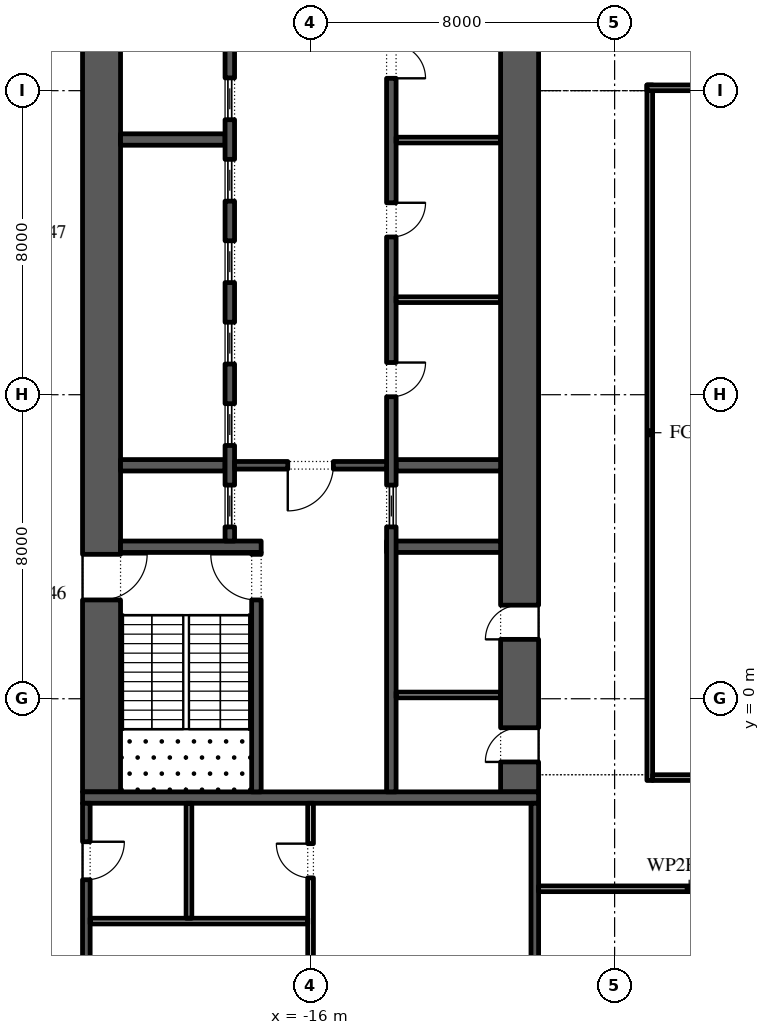
"""IFC4 building model, lengths in metres.
Left out: names, types, materials, properties, quantities, classifications, styles, units other than length and angle.
Written with IfcOpenShell. Run it as: python <this file> out.ifc"""

import sys

from ifc_helpers import new_model, si_unit, direction, frame, frame_2d, origin, place, context, subcontext, project, spatial, rectangle, extrude, element, fill, save


model = new_model("IFC4")
c1 = context("Model", 3, precision=1e-05, world=origin(), true_north=direction((0.0, 1.0)))
c2 = subcontext(c1, "Body", "Model", "MODEL_VIEW")
j1 = project(units=[si_unit("LENGTHUNIT", "METRE"), si_unit("PLANEANGLEUNIT", "RADIAN")], contexts=[c1])
p1 = place(None, origin())
s1 = spatial("IfcSite", under=j1, at=p1, CompositionType="ELEMENT")
p2 = place(p1, origin())
s2 = spatial("IfcBuilding", under=s1, at=p2, CompositionType="ELEMENT")
p3 = place(p2, frame((0.0, 0.0, 19.2)))
s3 = spatial("IfcBuildingStorey", under=s2, at=p3, CompositionType="ELEMENT", Elevation=19.2)
p4 = place(p3, frame((-7.075, -2.15, 0.0), z_axis=(0.0, 0.0, 1.0), x_axis=(0.0, 1.0, 0.0)))
e1 = element("IfcWall", 1, at=p4, inside=s3, PredefinedType="STANDARD", context=c2, shape_type="SweptSolid", body=[
    extrude(rectangle(XDim=18.3, YDim=0.15, at=frame_2d((9.15, 0.0))), origin(), (0.0, 0.0, 1.0), 4.5),
])
for number, where, z_axis, x_axis in (
    (2, (-7.15, 16.075, 0.0), (0.0, 0.0, 1.0), (1.0, 0.0, 0.0)),
    (3, (7.15, -2.075, 0.0), (0.0, 0.0, 1.0), (-1.0, 0.0, 0.0)),
):
    element("IfcWall", number, at=place(p3, frame(where, z_axis=z_axis, x_axis=x_axis)), inside=s3, PredefinedType="STANDARD", context=c2, shape_type="SweptSolid", body=[
        extrude(rectangle(XDim=14.15, YDim=0.15, at=frame_2d((7.075, 0.0))), origin(), (0.0, 0.0, 1.0), 3.52),
    ])
p5 = place(p3, frame((-21.5, -2.45, 0.0), z_axis=(0.0, 0.0, 1.0), x_axis=(0.0, 1.0, 0.0)))
e4 = element("IfcWall", 4, at=p5, inside=s3, PredefinedType="SHEAR", context=c2, shape_type="SweptSolid", body=[
    extrude(rectangle(XDim=27.9, YDim=1.0, at=frame_2d((13.95, 0.0))), origin(), (0.0, 0.0, 1.0), 4.5),
])
p6 = place(p5, frame((5.05, 0.0, 0.0)))
e5 = element("IfcOpeningElement", 5, at=p6, cuts=e4, PredefinedType="OPENING", context=c2, shape_type="SweptSolid", body=[
    extrude(rectangle(XDim=1.2, YDim=2.1, at=frame_2d((0.6, 1.05))), frame((0.0, 0.51, 0.0), z_axis=(0.0, -1.0, 0.0), x_axis=(1.0, 0.0, 0.0)), (0.0, 0.0, 1.0), 1.02),
])
p7 = place(p5, frame((21.65, 0.0, 0.0)))
e6 = element("IfcOpeningElement", 6, at=p7, cuts=e4, PredefinedType="OPENING", context=c2, shape_type="SweptSolid", body=[
    extrude(rectangle(XDim=1.2, YDim=2.1, at=frame_2d((0.6, 1.05))), frame((0.0, 0.51, 0.0), z_axis=(0.0, -1.0, 0.0), x_axis=(1.0, 0.0, 0.0)), (0.0, 0.0, 1.0), 1.02),
])
p8 = place(p3, frame((-10.5, -2.45, 0.0), z_axis=(0.0, 0.0, 1.0), x_axis=(0.0, 1.0, 0.0)))
e7 = element("IfcWall", 7, at=p8, inside=s3, PredefinedType="SHEAR", context=c2, shape_type="SweptSolid", body=[
    extrude(rectangle(XDim=27.9, YDim=1.0, at=frame_2d((13.95, 0.0))), origin(), (0.0, 0.0, 1.0), 4.5),
])
p9 = place(p8, frame((23.65, 0.0, 0.0)))
e8 = element("IfcOpeningElement", 8, at=p9, cuts=e7, PredefinedType="OPENING", context=c2, shape_type="SweptSolid", body=[
    extrude(rectangle(XDim=2.4, YDim=2.1, at=frame_2d((1.2, 1.05))), frame((0.0, 0.51, 0.0), z_axis=(0.0, -1.0, 0.0), x_axis=(1.0, 0.0, 0.0)), (0.0, 0.0, 1.0), 1.02),
])
p10 = place(p8, frame((0.788, 0.0, 0.0)))
e9 = element("IfcOpeningElement", 9, at=p10, cuts=e7, PredefinedType="OPENING", context=c2, shape_type="SweptSolid", body=[
    extrude(rectangle(XDim=0.9, YDim=2.1, at=frame_2d((0.45, 1.05))), frame((0.0, 0.51, 0.0), z_axis=(0.0, -1.0, 0.0), x_axis=(1.0, 0.0, 0.0)), (0.0, 0.0, 1.0), 1.02),
])
p11 = place(p8, frame((4.012, 0.0, 0.0)))
e10 = element("IfcOpeningElement", 10, at=p11, cuts=e7, PredefinedType="OPENING", context=c2, shape_type="SweptSolid", body=[
    extrude(rectangle(XDim=0.9, YDim=2.1, at=frame_2d((0.45, 1.05))), frame((0.0, 0.51, 0.0), z_axis=(0.0, -1.0, 0.0), x_axis=(1.0, 0.0, 0.0)), (0.0, 0.0, 1.0), 1.02),
])
p12 = place(p3, frame((-22.0, -2.6, 0.0), z_axis=(0.0, 0.0, 1.0), x_axis=(1.0, 0.0, 0.0)))
e11 = element("IfcWall", 11, at=p12, inside=s3, PredefinedType="SHEAR", context=c2, shape_type="SweptSolid", body=[
    extrude(rectangle(XDim=12.0, YDim=0.3, at=frame_2d((6.0, 0.0))), origin(), (0.0, 0.0, 1.0), 4.5),
])
p13 = place(p3, frame((-21.0, 4.0, 0.0), z_axis=(0.0, 0.0, 1.0), x_axis=(1.0, 0.0, 0.0)))
e12 = element("IfcWall", 12, at=p13, inside=s3, PredefinedType="SHEAR", context=c2, shape_type="SweptSolid", body=[
    extrude(rectangle(XDim=3.7, YDim=0.3, at=frame_2d((1.85, 0.0))), origin(), (0.0, 0.0, 1.0), 4.5),
])
p14 = place(p3, frame((-17.425, -2.45, 0.0), z_axis=(0.0, 0.0, 1.0), x_axis=(0.0, 1.0, 0.0)))
e13 = element("IfcWall", 13, at=p14, inside=s3, PredefinedType="SHEAR", context=c2, shape_type="SweptSolid", body=[
    extrude(rectangle(XDim=6.3, YDim=0.25, at=frame_2d((3.15, 0.0))), origin(), (0.0, 0.0, 1.0), 4.5),
])
p15 = place(p14, frame((5.05, 0.0, 0.0)))
e14 = element("IfcOpeningElement", 14, at=p15, cuts=e13, PredefinedType="OPENING", context=c2, shape_type="SweptSolid", body=[
    extrude(rectangle(XDim=1.2, YDim=2.1, at=frame_2d((0.6, 1.05))), frame((0.0, 0.135, 0.0), z_axis=(0.0, -1.0, 0.0), x_axis=(1.0, 0.0, 0.0)), (0.0, 0.0, 1.0), 0.27),
])
for number, where, z_axis, x_axis in (
    (15, (-21.0, 6.143, 0.0), (0.0, 0.0, 1.0), (1.0, 0.0, 0.0)),
    (16, (-21.0, 14.714, 0.0), (0.0, 0.0, 1.0), (1.0, 0.0, 0.0)),
):
    element("IfcWall", number, at=place(p3, frame(where, z_axis=z_axis, x_axis=x_axis)), inside=s3, PredefinedType="SHEAR", context=c2, shape_type="SweptSolid", body=[
        extrude(rectangle(XDim=2.75, YDim=0.3, at=frame_2d((1.375, 0.0))), origin(), (0.0, 0.0, 1.0), 4.5),
    ])
p16 = place(p3, frame((-18.125, 4.15, 0.0), z_axis=(0.0, 0.0, 1.0), x_axis=(0.0, 1.0, 0.0)))
e17 = element("IfcWall", 17, at=p16, inside=s3, PredefinedType="SHEAR", context=c2, shape_type="SweptSolid", body=[
    extrude(rectangle(XDim=14.7, YDim=0.25, at=frame_2d((7.35, 0.0))), origin(), (0.0, 0.0, 1.0), 4.5),
])
p17 = place(p16, frame((0.371, 0.0, 0.0)))
e18 = element("IfcOpeningElement", 18, at=p17, cuts=e17, PredefinedType="OPENING", context=c2, shape_type="SweptSolid", body=[
    extrude(rectangle(XDim=1.1, YDim=2.1, at=frame_2d((0.55, 1.05))), frame((0.0, 0.135, 0.0), z_axis=(0.0, -1.0, 0.0), x_axis=(1.0, 0.0, 0.0)), (0.0, 0.0, 1.0), 0.27),
])
p18 = place(p16, frame((2.514, 0.0, 0.0)))
e19 = element("IfcOpeningElement", 19, at=p18, cuts=e17, PredefinedType="OPENING", context=c2, shape_type="SweptSolid", body=[
    extrude(rectangle(XDim=1.1, YDim=2.1, at=frame_2d((0.55, 1.05))), frame((0.0, 0.135, 0.0), z_axis=(0.0, -1.0, 0.0), x_axis=(1.0, 0.0, 0.0)), (0.0, 0.0, 1.0), 0.27),
])
p19 = place(p16, frame((4.657, 0.0, 0.0)))
e20 = element("IfcOpeningElement", 20, at=p19, cuts=e17, PredefinedType="OPENING", context=c2, shape_type="SweptSolid", body=[
    extrude(rectangle(XDim=1.1, YDim=2.1, at=frame_2d((0.55, 1.05))), frame((0.0, 0.135, 0.0), z_axis=(0.0, -1.0, 0.0), x_axis=(1.0, 0.0, 0.0)), (0.0, 0.0, 1.0), 0.27),
])
p20 = place(p16, frame((6.8, 0.0, 0.0)))
e21 = element("IfcOpeningElement", 21, at=p20, cuts=e17, PredefinedType="OPENING", context=c2, shape_type="SweptSolid", body=[
    extrude(rectangle(XDim=1.1, YDim=2.1, at=frame_2d((0.55, 1.05))), frame((0.0, 0.135, 0.0), z_axis=(0.0, -1.0, 0.0), x_axis=(1.0, 0.0, 0.0)), (0.0, 0.0, 1.0), 0.27),
])
p21 = place(p16, frame((8.943, 0.0, 0.0)))
e22 = element("IfcOpeningElement", 22, at=p21, cuts=e17, PredefinedType="OPENING", context=c2, shape_type="SweptSolid", body=[
    extrude(rectangle(XDim=1.1, YDim=2.1, at=frame_2d((0.55, 1.05))), frame((0.0, 0.135, 0.0), z_axis=(0.0, -1.0, 0.0), x_axis=(1.0, 0.0, 0.0)), (0.0, 0.0, 1.0), 0.27),
])
p22 = place(p16, frame((11.086, 0.0, 0.0)))
e23 = element("IfcOpeningElement", 23, at=p22, cuts=e17, PredefinedType="OPENING", context=c2, shape_type="SweptSolid", body=[
    extrude(rectangle(XDim=1.1, YDim=2.1, at=frame_2d((0.55, 1.05))), frame((0.0, 0.135, 0.0), z_axis=(0.0, -1.0, 0.0), x_axis=(1.0, 0.0, 0.0)), (0.0, 0.0, 1.0), 0.27),
])
p23 = place(p16, frame((13.229, 0.0, 0.0)))
e24 = element("IfcOpeningElement", 24, at=p23, cuts=e17, PredefinedType="OPENING", context=c2, shape_type="SweptSolid", body=[
    extrude(rectangle(XDim=1.1, YDim=2.1, at=frame_2d((0.55, 1.05))), frame((0.0, 0.135, 0.0), z_axis=(0.0, -1.0, 0.0), x_axis=(1.0, 0.0, 0.0)), (0.0, 0.0, 1.0), 0.27),
])
p24 = place(p3, frame((-14.0, 4.0, 0.0), z_axis=(0.0, 0.0, 1.0), x_axis=(1.0, 0.0, 0.0)))
e25 = element("IfcWall", 25, at=p24, inside=s3, PredefinedType="SHEAR", context=c2, shape_type="SweptSolid", body=[
    extrude(rectangle(XDim=3.0, YDim=0.3, at=frame_2d((1.5, 0.0))), origin(), (0.0, 0.0, 1.0), 4.5),
])
p25 = place(p3, frame((-13.75, 6.143, 0.0), z_axis=(0.0, 0.0, 1.0), x_axis=(1.0, 0.0, 0.0)))
e26 = element("IfcWall", 26, at=p25, inside=s3, PredefinedType="SHEAR", context=c2, shape_type="SweptSolid", body=[
    extrude(rectangle(XDim=2.75, YDim=0.3, at=frame_2d((1.375, 0.0))), origin(), (0.0, 0.0, 1.0), 4.5),
])
p26 = place(p3, frame((-13.875, -2.45, 0.0), z_axis=(0.0, 0.0, 1.0), x_axis=(0.0, 1.0, 0.0)))
e27 = element("IfcWall", 27, at=p26, inside=s3, PredefinedType="SHEAR", context=c2, shape_type="SweptSolid", body=[
    extrude(rectangle(XDim=21.3, YDim=0.25, at=frame_2d((10.65, 0.0))), origin(), (0.0, 0.0, 1.0), 4.5),
])
p27 = place(p26, frame((10.396, 0.0, 0.0)))
e28 = element("IfcOpeningElement", 28, at=p27, cuts=e27, PredefinedType="OPENING", context=c2, shape_type="SweptSolid", body=[
    extrude(rectangle(XDim=0.9, YDim=2.1, at=frame_2d((0.45, 1.05))), frame((0.0, 0.135, 0.0), z_axis=(0.0, -1.0, 0.0), x_axis=(1.0, 0.0, 0.0)), (0.0, 0.0, 1.0), 0.27),
])
p28 = place(p26, frame((14.6, 0.0, 0.0)))
e29 = element("IfcOpeningElement", 29, at=p28, cuts=e27, PredefinedType="OPENING", context=c2, shape_type="SweptSolid", body=[
    extrude(rectangle(XDim=0.9, YDim=2.1, at=frame_2d((0.45, 1.05))), frame((0.0, 0.135, 0.0), z_axis=(0.0, -1.0, 0.0), x_axis=(1.0, 0.0, 0.0)), (0.0, 0.0, 1.0), 0.27),
])
p29 = place(p26, frame((18.775, 0.0, 0.0)))
e30 = element("IfcOpeningElement", 30, at=p29, cuts=e27, PredefinedType="OPENING", context=c2, shape_type="SweptSolid", body=[
    extrude(rectangle(XDim=0.9, YDim=2.1, at=frame_2d((0.45, 1.05))), frame((0.0, 0.135, 0.0), z_axis=(0.0, -1.0, 0.0), x_axis=(1.0, 0.0, 0.0)), (0.0, 0.0, 1.0), 0.27),
])
p30 = place(p26, frame((6.971, 0.0, 0.0)))
e31 = element("IfcOpeningElement", 31, at=p30, cuts=e27, PredefinedType="OPENING", context=c2, shape_type="SweptSolid", body=[
    extrude(rectangle(XDim=1.1, YDim=2.1, at=frame_2d((0.55, 1.05))), frame((0.0, 0.135, 0.0), z_axis=(0.0, -1.0, 0.0), x_axis=(1.0, 0.0, 0.0)), (0.0, 0.0, 1.0), 0.27),
])
for number, where, z_axis, x_axis in (
    (32, (-13.75, 10.5, 0.0), (0.0, 0.0, 1.0), (1.0, 0.0, 0.0)),
    (33, (-13.75, 14.7, 0.0), (0.0, 0.0, 1.0), (1.0, 0.0, 0.0)),
):
    element("IfcWall", number, at=place(p3, frame(where, z_axis=z_axis, x_axis=x_axis)), inside=s3, PredefinedType="PARTITIONING", context=c2, shape_type="SweptSolid", body=[
        extrude(rectangle(XDim=2.75, YDim=0.15, at=frame_2d((1.375, 0.0))), origin(), (0.0, 0.0, 1.0), 4.5),
    ])
p31 = place(p3, frame((-18.0, 6.143, 0.0), z_axis=(0.0, 0.0, 1.0), x_axis=(1.0, 0.0, 0.0)))
e34 = element("IfcWall", 34, at=p31, inside=s3, PredefinedType="SHEAR", context=c2, shape_type="SweptSolid", body=[
    extrude(rectangle(XDim=4.0, YDim=0.2, at=frame_2d((2.0, 0.0))), origin(), (0.0, 0.0, 1.0), 4.5),
])
p32 = place(p31, frame((1.4, 0.0, 0.0)))
e35 = element("IfcOpeningElement", 35, at=p32, cuts=e34, PredefinedType="OPENING", context=c2, shape_type="SweptSolid", body=[
    extrude(rectangle(XDim=1.2, YDim=2.1, at=frame_2d((0.6, 1.05))), frame((0.0, 0.11, 0.0), z_axis=(0.0, -1.0, 0.0), x_axis=(1.0, 0.0, 0.0)), (0.0, 0.0, 1.0), 0.22),
])
p33 = place(p3, frame((-13.75, 0.1, 0.0), z_axis=(0.0, 0.0, 1.0), x_axis=(1.0, 0.0, 0.0)))
e36 = element("IfcWall", 36, at=p33, inside=s3, PredefinedType="PARTITIONING", context=c2, shape_type="SweptSolid", body=[
    extrude(rectangle(XDim=2.75, YDim=0.15, at=frame_2d((1.375, 0.0))), origin(), (0.0, 0.0, 1.0), 4.5),
])
p34 = place(p3, frame((-21.9, -15.8, 0.0), z_axis=(0.0, 0.0, 1.0), x_axis=(0.0, 1.0, 0.0)))
e37 = element("IfcWall", 37, at=p34, inside=s3, PredefinedType="SHEAR", context=c2, shape_type="SweptSolid", body=[
    extrude(rectangle(XDim=13.05, YDim=0.2, at=frame_2d((6.525, 0.0))), origin(), (0.0, 0.0, 1.0), 4.5),
])
p35 = place(p34, frame((4.488, 0.0, 0.0)))
e38 = element("IfcOpeningElement", 38, at=p35, cuts=e37, PredefinedType="OPENING", context=c2, shape_type="SweptSolid", body=[
    extrude(rectangle(XDim=0.9, YDim=2.1, at=frame_2d((0.45, 1.05))), frame((0.0, 0.11, 0.0), z_axis=(0.0, -1.0, 0.0), x_axis=(1.0, 0.0, 0.0)), (0.0, 0.0, 1.0), 0.22),
])
p36 = place(p34, frame((11.038, 0.0, 0.0)))
e39 = element("IfcOpeningElement", 39, at=p36, cuts=e37, PredefinedType="OPENING", context=c2, shape_type="SweptSolid", body=[
    extrude(rectangle(XDim=1.0, YDim=2.1, at=frame_2d((0.5, 1.05))), frame((0.0, 0.11, 0.0), z_axis=(0.0, -1.0, 0.0), x_axis=(1.0, 0.0, 0.0)), (0.0, 0.0, 1.0), 0.22),
])
p37 = place(p3, frame((-10.1, -15.8, 0.0), z_axis=(0.0, 0.0, 1.0), x_axis=(0.0, 1.0, 0.0)))
e40 = element("IfcWall", 40, at=p37, inside=s3, PredefinedType="SHEAR", context=c2, shape_type="SweptSolid", body=[
    extrude(rectangle(XDim=13.05, YDim=0.2, at=frame_2d((6.525, 0.0))), origin(), (0.0, 0.0, 1.0), 4.5),
])
p38 = place(p37, frame((6.075, 0.0, 0.0)))
e41 = element("IfcOpeningElement", 41, at=p38, cuts=e40, PredefinedType="OPENING", context=c2, shape_type="SweptSolid", body=[
    extrude(rectangle(XDim=0.9, YDim=2.1, at=frame_2d((0.45, 1.05))), frame((0.0, 0.11, 0.0), z_axis=(0.0, -1.0, 0.0), x_axis=(1.0, 0.0, 0.0)), (0.0, 0.0, 1.0), 0.22),
])
p39 = place(p3, frame((-16.0, -15.8, 0.0), z_axis=(0.0, 0.0, 1.0), x_axis=(0.0, 1.0, 0.0)))
e42 = element("IfcWall", 42, at=p39, inside=s3, PredefinedType="PARTITIONING", context=c2, shape_type="SweptSolid", body=[
    extrude(rectangle(XDim=13.05, YDim=0.15, at=frame_2d((6.525, 0.0))), origin(), (0.0, 0.0, 1.0), 4.5),
])
p40 = place(p39, frame((11.087, 0.0, 0.0)))
e43 = element("IfcOpeningElement", 43, at=p40, cuts=e42, PredefinedType="OPENING", context=c2, shape_type="SweptSolid", body=[
    extrude(rectangle(XDim=0.9, YDim=2.1, at=frame_2d((0.45, 1.05))), frame((0.0, 0.085, 0.0), z_axis=(0.0, -1.0, 0.0), x_axis=(1.0, 0.0, 0.0)), (0.0, 0.0, 1.0), 0.17),
])
p41 = place(p3, frame((-21.8, -5.85, 0.0), z_axis=(0.0, 0.0, 1.0), x_axis=(1.0, 0.0, 0.0)))
e44 = element("IfcWall", 44, at=p41, inside=s3, PredefinedType="PARTITIONING", context=c2, shape_type="SweptSolid", body=[
    extrude(rectangle(XDim=5.725, YDim=0.15, at=frame_2d((2.863, 0.0))), origin(), (0.0, 0.0, 1.0), 4.5),
])
p42 = place(p3, frame((-19.2, -5.775, 0.0), z_axis=(0.0, 0.0, 1.0), x_axis=(0.0, 1.0, 0.0)))
e45 = element("IfcWall", 45, at=p42, inside=s3, PredefinedType="PARTITIONING", context=c2, shape_type="SweptSolid", body=[
    extrude(rectangle(XDim=3.025, YDim=0.15, at=frame_2d((1.512, 0.0))), origin(), (0.0, 0.0, 1.0), 4.5),
])
p43 = place(p3, frame((-10.0, -5.0, 0.0), z_axis=(0.0, 0.0, 1.0), x_axis=(1.0, 0.0, 0.0)))
e46 = element("IfcWall", 46, at=p43, inside=s3, PredefinedType="PARTITIONING", context=c2, shape_type="SweptSolid", body=[
    extrude(rectangle(XDim=7.925, YDim=0.15, at=frame_2d((3.962, 0.0))), origin(), (0.0, 0.0, 1.0), 4.5),
])
p44 = place(p17, origin())
e47 = element("IfcDoor", 47, at=p44, inside=s3, OperationType="SLIDING_TO_LEFT", PredefinedType="DOOR", context=c2, shape_type="SweptSolid", body=[
    extrude(rectangle(XDim=1.1, YDim=2.1, at=frame_2d((0.55, 1.05))), frame((0.0, 0.025, 0.0), z_axis=(0.0, -1.0, 0.0), x_axis=(1.0, 0.0, 0.0)), (0.0, 0.0, 1.0), 0.05),
])
fill(e18, e47)
p45 = place(p18, origin())
e48 = element("IfcDoor", 48, at=p45, inside=s3, OperationType="SLIDING_TO_LEFT", PredefinedType="DOOR", context=c2, shape_type="SweptSolid", body=[
    extrude(rectangle(XDim=1.1, YDim=2.1, at=frame_2d((0.55, 1.05))), frame((0.0, 0.025, 0.0), z_axis=(0.0, -1.0, 0.0), x_axis=(1.0, 0.0, 0.0)), (0.0, 0.0, 1.0), 0.05),
])
fill(e19, e48)
p46 = place(p19, origin())
e49 = element("IfcDoor", 49, at=p46, inside=s3, OperationType="SLIDING_TO_LEFT", PredefinedType="DOOR", context=c2, shape_type="SweptSolid", body=[
    extrude(rectangle(XDim=1.1, YDim=2.1, at=frame_2d((0.55, 1.05))), frame((0.0, 0.025, 0.0), z_axis=(0.0, -1.0, 0.0), x_axis=(1.0, 0.0, 0.0)), (0.0, 0.0, 1.0), 0.05),
])
fill(e20, e49)
p47 = place(p20, origin())
e50 = element("IfcDoor", 50, at=p47, inside=s3, OperationType="SLIDING_TO_LEFT", PredefinedType="DOOR", context=c2, shape_type="SweptSolid", body=[
    extrude(rectangle(XDim=1.1, YDim=2.1, at=frame_2d((0.55, 1.05))), frame((0.0, 0.025, 0.0), z_axis=(0.0, -1.0, 0.0), x_axis=(1.0, 0.0, 0.0)), (0.0, 0.0, 1.0), 0.05),
])
fill(e21, e50)
p48 = place(p21, origin())
e51 = element("IfcDoor", 51, at=p48, inside=s3, OperationType="SLIDING_TO_LEFT", PredefinedType="DOOR", context=c2, shape_type="SweptSolid", body=[
    extrude(rectangle(XDim=1.1, YDim=2.1, at=frame_2d((0.55, 1.05))), frame((0.0, 0.025, 0.0), z_axis=(0.0, -1.0, 0.0), x_axis=(1.0, 0.0, 0.0)), (0.0, 0.0, 1.0), 0.05),
])
fill(e22, e51)
p49 = place(p22, origin())
e52 = element("IfcDoor", 52, at=p49, inside=s3, OperationType="SLIDING_TO_LEFT", PredefinedType="DOOR", context=c2, shape_type="SweptSolid", body=[
    extrude(rectangle(XDim=1.1, YDim=2.1, at=frame_2d((0.55, 1.05))), frame((0.0, 0.025, 0.0), z_axis=(0.0, -1.0, 0.0), x_axis=(1.0, 0.0, 0.0)), (0.0, 0.0, 1.0), 0.05),
])
fill(e23, e52)
p50 = place(p27, frame((0.9, -0.2, 0.0), z_axis=(0.0, 0.0, 1.0), x_axis=(-1.0, 0.0, 0.0)))
e53 = element("IfcDoor", 53, at=p50, inside=s3, OperationType="SINGLE_SWING_RIGHT", PredefinedType="DOOR", context=c2, shape_type="SweptSolid", body=[
    extrude(rectangle(XDim=0.9, YDim=2.1, at=frame_2d((0.45, 1.05))), frame((0.0, -0.075, 0.0), z_axis=(0.0, -1.0, 0.0), x_axis=(1.0, 0.0, 0.0)), (0.0, 0.0, 1.0), 0.05),
])
fill(e28, e53)
p51 = place(p28, frame((0.9, -0.2, 0.0), z_axis=(0.0, 0.0, 1.0), x_axis=(-1.0, 0.0, 0.0)))
e54 = element("IfcDoor", 54, at=p51, inside=s3, OperationType="SINGLE_SWING_RIGHT", PredefinedType="DOOR", context=c2, shape_type="SweptSolid", body=[
    extrude(rectangle(XDim=0.9, YDim=2.1, at=frame_2d((0.45, 1.05))), frame((0.0, -0.075, 0.0), z_axis=(0.0, -1.0, 0.0), x_axis=(1.0, 0.0, 0.0)), (0.0, 0.0, 1.0), 0.05),
])
fill(e29, e54)
p52 = place(p29, frame((0.9, -0.2, 0.0), z_axis=(0.0, 0.0, 1.0), x_axis=(-1.0, 0.0, 0.0)))
e55 = element("IfcDoor", 55, at=p52, inside=s3, OperationType="SINGLE_SWING_LEFT", PredefinedType="DOOR", context=c2, shape_type="SweptSolid", body=[
    extrude(rectangle(XDim=0.9, YDim=2.1, at=frame_2d((0.45, 1.05))), frame((0.0, -0.075, 0.0), z_axis=(0.0, -1.0, 0.0), x_axis=(1.0, 0.0, 0.0)), (0.0, 0.0, 1.0), 0.05),
])
fill(e30, e55)
p53 = place(p30, origin())
e56 = element("IfcDoor", 56, at=p53, inside=s3, OperationType="SLIDING_TO_LEFT", PredefinedType="DOOR", context=c2, shape_type="SweptSolid", body=[
    extrude(rectangle(XDim=1.1, YDim=2.1, at=frame_2d((0.55, 1.05))), frame((0.0, 0.025, 0.0), z_axis=(0.0, -1.0, 0.0), x_axis=(1.0, 0.0, 0.0)), (0.0, 0.0, 1.0), 0.05),
])
fill(e31, e56)
p54 = place(p32, frame((1.2, 0.0, 0.0), z_axis=(0.0, 0.0, 1.0), x_axis=(-1.0, 0.0, 0.0)))
e57 = element("IfcDoor", 57, at=p54, inside=s3, OperationType="SINGLE_SWING_LEFT", PredefinedType="DOOR", context=c2, shape_type="SweptSolid", body=[
    extrude(rectangle(XDim=1.2, YDim=2.1, at=frame_2d((0.6, 1.05))), frame((0.0, 0.025, 0.0), z_axis=(0.0, -1.0, 0.0), x_axis=(1.0, 0.0, 0.0)), (0.0, 0.0, 1.0), 0.05),
])
fill(e35, e57)
p55 = place(p15, origin())
e58 = element("IfcDoor", 58, at=p55, inside=s3, OperationType="SINGLE_SWING_LEFT", PredefinedType="DOOR", context=c2, shape_type="SweptSolid", body=[
    extrude(rectangle(XDim=1.2, YDim=2.1, at=frame_2d((0.6, 1.05))), frame((0.0, 0.025, 0.0), z_axis=(0.0, -1.0, 0.0), x_axis=(1.0, 0.0, 0.0)), (0.0, 0.0, 1.0), 0.05),
])
fill(e14, e58)
p56 = place(p6, frame((1.2, 0.0, 0.0), z_axis=(0.0, 0.0, 1.0), x_axis=(-1.0, 0.0, 0.0)))
e59 = element("IfcDoor", 59, at=p56, inside=s3, OperationType="SINGLE_SWING_RIGHT", PredefinedType="DOOR", context=c2, shape_type="SweptSolid", body=[
    extrude(rectangle(XDim=1.2, YDim=2.1, at=frame_2d((0.6, 1.05))), frame((0.0, 0.025, 0.0), z_axis=(0.0, -1.0, 0.0), x_axis=(1.0, 0.0, 0.0)), (0.0, 0.0, 1.0), 0.05),
])
fill(e5, e59)
p57 = place(p10, origin())
e60 = element("IfcDoor", 60, at=p57, inside=s3, OperationType="SINGLE_SWING_RIGHT", PredefinedType="DOOR", context=c2, shape_type="SweptSolid", body=[
    extrude(rectangle(XDim=0.9, YDim=2.1, at=frame_2d((0.45, 1.05))), frame((0.0, 0.5, 0.0), z_axis=(0.0, -1.0, 0.0), x_axis=(1.0, 0.0, 0.0)), (0.0, 0.0, 1.0), 0.05),
])
fill(e9, e60)
p58 = place(p11, origin())
e61 = element("IfcDoor", 61, at=p58, inside=s3, OperationType="SINGLE_SWING_RIGHT", PredefinedType="DOOR", context=c2, shape_type="SweptSolid", body=[
    extrude(rectangle(XDim=0.9, YDim=2.1, at=frame_2d((0.45, 1.05))), frame((0.0, 0.5, 0.0), z_axis=(0.0, -1.0, 0.0), x_axis=(1.0, 0.0, 0.0)), (0.0, 0.0, 1.0), 0.05),
])
fill(e10, e61)
p59 = place(p36, frame((1.0, -0.15, 0.0), z_axis=(0.0, 0.0, 1.0), x_axis=(-1.0, 0.0, 0.0)))
e62 = element("IfcDoor", 62, at=p59, inside=s3, OperationType="SINGLE_SWING_RIGHT", PredefinedType="DOOR", context=c2, shape_type="SweptSolid", body=[
    extrude(rectangle(XDim=1.0, YDim=2.1, at=frame_2d((0.5, 1.05))), frame((0.0, -0.05, 0.0), z_axis=(0.0, -1.0, 0.0), x_axis=(1.0, 0.0, 0.0)), (0.0, 0.0, 1.0), 0.05),
])
fill(e39, e62)
p60 = place(p40, origin())
e63 = element("IfcDoor", 63, at=p60, inside=s3, OperationType="SINGLE_SWING_LEFT", PredefinedType="DOOR", context=c2, shape_type="SweptSolid", body=[
    extrude(rectangle(XDim=0.9, YDim=2.1, at=frame_2d((0.45, 1.05))), frame((0.0, 0.025, 0.0), z_axis=(0.0, -1.0, 0.0), x_axis=(1.0, 0.0, 0.0)), (0.0, 0.0, 1.0), 0.05),
])
fill(e43, e63)
save(model, sys.argv[1])
